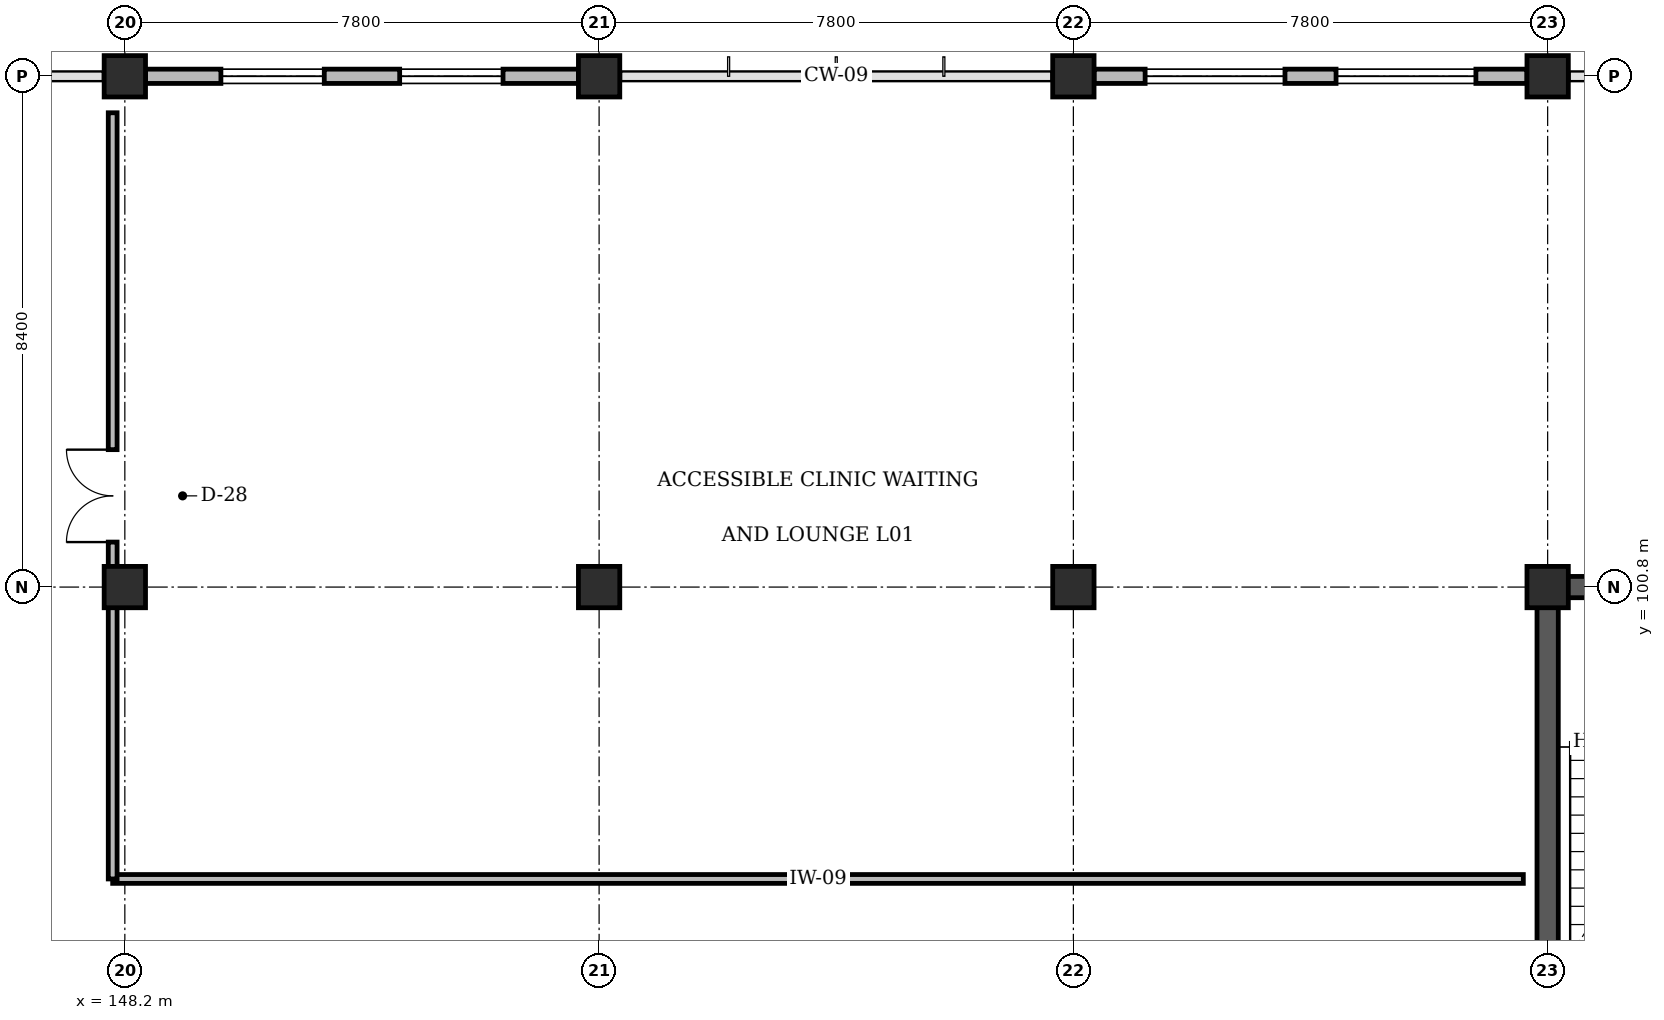
"""IFC4 building model, lengths in metres.
Left out: names, types, materials, properties, quantities, classifications, styles, units other than length and angle.
Written with IfcOpenShell. Run it as: python <this file> out.ifc"""

import sys

from ifc_helpers import new_model, si_unit, direction, frame, frame_2d, origin, origin_2d, place, context, subcontext, project, spatial, rectangle, extrude, element, fill, save


model = new_model("IFC4")
c1 = context("Model", 3, precision=1e-05, world=origin(), true_north=direction((0.0, 1.0)))
c2 = subcontext(c1, "Body", "Model", "MODEL_VIEW")
j1 = project(units=[si_unit("LENGTHUNIT", "METRE"), si_unit("PLANEANGLEUNIT", "RADIAN")], contexts=[c1])
p1 = place(None, origin())
s1 = spatial("IfcSite", under=j1, at=p1, CompositionType="ELEMENT")
p2 = place(p1, origin())
s2 = spatial("IfcBuilding", under=s1, at=p2, CompositionType="ELEMENT")
p3 = place(p2, frame((0.0, 0.0, 4.8)))
s3 = spatial("IfcBuildingStorey", under=s2, at=p3, CompositionType="ELEMENT", Elevation=4.8)
p4 = place(p3, frame((171.425, 100.8, 0.0), z_axis=(0.0, 0.0, 1.0), x_axis=(1.0, 0.0, 0.0)))
e1 = element("IfcWall", 1, at=p4, inside=s3, PredefinedType="SHEAR", context=c2, shape_type="SweptSolid", body=[
    extrude(rectangle(XDim=8.15, YDim=0.35, at=frame_2d((4.075, 0.0))), origin(), (0.0, 0.0, 1.0), 4.48),
])
p5 = place(p3, frame((171.6, 92.4, 0.0), z_axis=(0.0, 0.0, 1.0), x_axis=(0.0, 1.0, 0.0)))
e2 = element("IfcWall", 2, at=p5, inside=s3, PredefinedType="SHEAR", context=c2, shape_type="SweptSolid", body=[
    extrude(rectangle(XDim=8.4, YDim=0.35, at=frame_2d((4.2, 0.0))), origin(), (0.0, 0.0, 1.0), 4.48),
])
for number, where, z_axis, x_axis in (
    (3, (148.2, 100.8, 0.0), (0.0, 0.0, 1.0), (1.0, 0.0, 0.0)),
    (4, (148.2, 109.2, 0.0), (0.0, 0.0, 1.0), (1.0, 0.0, 0.0)),
    (5, (156.0, 100.8, 0.0), (0.0, 0.0, 1.0), (1.0, 0.0, 0.0)),
    (6, (156.0, 109.2, 0.0), (0.0, 0.0, 1.0), (1.0, 0.0, 0.0)),
    (7, (163.8, 100.8, 0.0), (0.0, 0.0, 1.0), (1.0, 0.0, 0.0)),
    (8, (163.8, 109.2, 0.0), (0.0, 0.0, 1.0), (1.0, 0.0, 0.0)),
    (9, (171.6, 100.8, 0.0), (0.0, 0.0, 1.0), (1.0, 0.0, 0.0)),
    (10, (171.6, 109.2, 0.0), (0.0, 0.0, 1.0), (1.0, 0.0, 0.0)),
):
    element("IfcColumn", number, at=place(p3, frame(where, z_axis=z_axis, x_axis=x_axis)), inside=s3, PredefinedType="COLUMN", context=c2, shape_type="SweptSolid", body=[
        extrude(rectangle(XDim=0.68, YDim=0.68, at=origin_2d()), origin(), (0.0, 0.0, 1.0), 4.8),
    ])
p6 = place(p3, frame((148.54, 109.2, 0.0), z_axis=(0.0, 0.0, 1.0), x_axis=(1.0, 0.0, 0.0)))
e11 = element("IfcWall", 11, at=p6, inside=s3, PredefinedType="STANDARD", context=c2, shape_type="SweptSolid", body=[
    extrude(rectangle(XDim=7.12, YDim=0.235, at=frame_2d((3.56, 0.0))), origin(), (0.0, 0.0, 1.0), 3.68),
])
p7 = place(p6, frame((1.24, 0.0, 0.9)))
e12 = element("IfcOpeningElement", 12, at=p7, cuts=e11, PredefinedType="OPENING", context=c2, shape_type="SweptSolid", body=[
    extrude(rectangle(XDim=1.7, YDim=1.6, at=frame_2d((0.85, 0.8))), frame((0.0, 0.127, 0.0), z_axis=(0.0, -1.0, 0.0), x_axis=(1.0, 0.0, 0.0)), (0.0, 0.0, 1.0), 0.255),
])
p8 = place(p6, frame((4.18, 0.0, 0.9)))
e13 = element("IfcOpeningElement", 13, at=p8, cuts=e11, PredefinedType="OPENING", context=c2, shape_type="SweptSolid", body=[
    extrude(rectangle(XDim=1.7, YDim=1.6, at=frame_2d((0.85, 0.8))), frame((0.0, 0.127, 0.0), z_axis=(0.0, -1.0, 0.0), x_axis=(1.0, 0.0, 0.0)), (0.0, 0.0, 1.0), 0.255),
])
p9 = place(p3, frame((164.14, 109.2, 0.0), z_axis=(0.0, 0.0, 1.0), x_axis=(1.0, 0.0, 0.0)))
e14 = element("IfcWall", 14, at=p9, inside=s3, PredefinedType="STANDARD", context=c2, shape_type="SweptSolid", body=[
    extrude(rectangle(XDim=7.12, YDim=0.235, at=frame_2d((3.56, 0.0))), origin(), (0.0, 0.0, 1.0), 3.68),
])
p10 = place(p9, frame((0.84, 0.0, 0.9)))
e15 = element("IfcOpeningElement", 15, at=p10, cuts=e14, PredefinedType="OPENING", context=c2, shape_type="SweptSolid", body=[
    extrude(rectangle(XDim=2.3, YDim=1.6, at=frame_2d((1.15, 0.8))), frame((0.0, 0.127, 0.0), z_axis=(0.0, -1.0, 0.0), x_axis=(1.0, 0.0, 0.0)), (0.0, 0.0, 1.0), 0.255),
])
p11 = place(p9, frame((3.98, 0.0, 0.9)))
e16 = element("IfcOpeningElement", 16, at=p11, cuts=e14, PredefinedType="OPENING", context=c2, shape_type="SweptSolid", body=[
    extrude(rectangle(XDim=2.3, YDim=1.6, at=frame_2d((1.15, 0.8))), frame((0.0, 0.127, 0.0), z_axis=(0.0, -1.0, 0.0), x_axis=(1.0, 0.0, 0.0)), (0.0, 0.0, 1.0), 0.255),
])
p12 = place(p3, frame((148.0, 96.0, 0.0), z_axis=(0.0, 0.0, 1.0), x_axis=(1.0, 0.0, 0.0)))
e17 = element("IfcWall", 17, at=p12, inside=s3, PredefinedType="PARTITIONING", context=c2, shape_type="SweptSolid", body=[
    extrude(rectangle(XDim=23.2, YDim=0.145, at=frame_2d((11.6, 0.0))), origin(), (0.0, 0.0, 1.0), 4.46),
])
p13 = place(p3, frame((148.0, 96.0, 0.0), z_axis=(0.0, 0.0, 1.0), x_axis=(0.0, 1.0, 0.0)))
e18 = element("IfcWall", 18, at=p13, inside=s3, PredefinedType="PARTITIONING", context=c2, shape_type="SweptSolid", body=[
    extrude(rectangle(XDim=12.6, YDim=0.145, at=frame_2d((6.3, 0.0))), origin(), (0.0, 0.0, 1.0), 3.665),
])
p14 = place(p13, frame((5.54, 0.0, 0.0)))
e19 = element("IfcOpeningElement", 19, at=p14, cuts=e18, PredefinedType="OPENING", context=c2, shape_type="SweptSolid", body=[
    extrude(rectangle(XDim=1.52, YDim=2.2, at=frame_2d((0.76, 1.1))), frame((0.0, 0.083, 0.0), z_axis=(0.0, -1.0, 0.0), x_axis=(1.0, 0.0, 0.0)), (0.0, 0.0, 1.0), 0.165),
])
p15 = place(p7, origin())
e20 = element("IfcWindow", 20, at=p15, inside=s3, PartitioningType="SINGLE_PANEL", PredefinedType="WINDOW", context=c2, shape_type="SweptSolid", body=[
    extrude(rectangle(XDim=1.7, YDim=1.6, at=frame_2d((0.85, 0.8))), frame((0.0, 0.03, 0.0), z_axis=(0.0, -1.0, 0.0), x_axis=(1.0, 0.0, 0.0)), (0.0, 0.0, 1.0), 0.06),
])
fill(e12, e20)
p16 = place(p8, origin())
e21 = element("IfcWindow", 21, at=p16, inside=s3, PartitioningType="SINGLE_PANEL", PredefinedType="WINDOW", context=c2, shape_type="SweptSolid", body=[
    extrude(rectangle(XDim=1.7, YDim=1.6, at=frame_2d((0.85, 0.8))), frame((0.0, 0.03, 0.0), z_axis=(0.0, -1.0, 0.0), x_axis=(1.0, 0.0, 0.0)), (0.0, 0.0, 1.0), 0.06),
])
fill(e13, e21)
p17 = place(p10, origin())
e22 = element("IfcWindow", 22, at=p17, inside=s3, PartitioningType="SINGLE_PANEL", PredefinedType="WINDOW", context=c2, shape_type="SweptSolid", body=[
    extrude(rectangle(XDim=2.3, YDim=1.6, at=frame_2d((1.15, 0.8))), frame((0.0, 0.03, 0.0), z_axis=(0.0, -1.0, 0.0), x_axis=(1.0, 0.0, 0.0)), (0.0, 0.0, 1.0), 0.06),
])
fill(e15, e22)
p18 = place(p11, origin())
e23 = element("IfcWindow", 23, at=p18, inside=s3, PartitioningType="SINGLE_PANEL", PredefinedType="WINDOW", context=c2, shape_type="SweptSolid", body=[
    extrude(rectangle(XDim=2.3, YDim=1.6, at=frame_2d((1.15, 0.8))), frame((0.0, 0.03, 0.0), z_axis=(0.0, -1.0, 0.0), x_axis=(1.0, 0.0, 0.0)), (0.0, 0.0, 1.0), 0.06),
])
fill(e16, e23)
p19 = place(p14, origin())
e24 = element("IfcDoor", 24, at=p19, inside=s3, OperationType="DOUBLE_DOOR_SINGLE_SWING", PredefinedType="DOOR", context=c2, shape_type="SweptSolid", body=[
    extrude(rectangle(XDim=1.52, YDim=2.2, at=frame_2d((0.76, 1.1))), frame((0.0, 0.025, 0.0), z_axis=(0.0, -1.0, 0.0), x_axis=(1.0, 0.0, 0.0)), (0.0, 0.0, 1.0), 0.05),
])
fill(e19, e24)
save(model, sys.argv[1])
